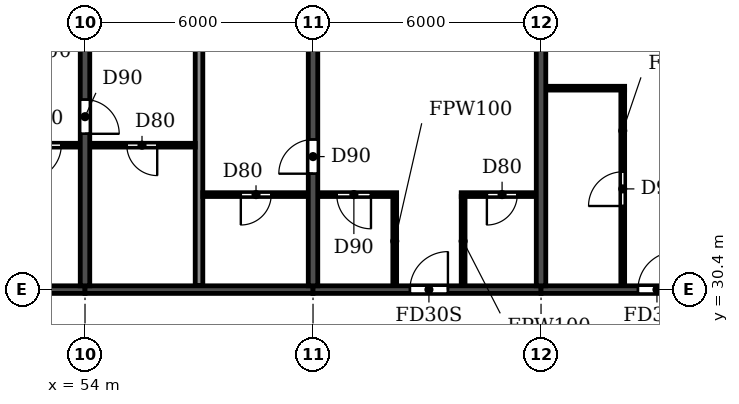
"""IFC4 building model, lengths in metres.
Left out: names, types, materials, properties, quantities, classifications, styles, units other than length and angle.
Written with IfcOpenShell. Run it as: python <this file> out.ifc"""

import sys

from ifc_helpers import new_model, si_unit, direction, frame, frame_2d, origin, place, context, subcontext, project, spatial, rectangle, extrude, element, fill, save


model = new_model("IFC4")
c1 = context("Model", 3, precision=1e-05, world=origin(), true_north=direction((0.0, 1.0)))
c2 = subcontext(c1, "Body", "Model", "MODEL_VIEW")
j1 = project(units=[si_unit("LENGTHUNIT", "METRE"), si_unit("PLANEANGLEUNIT", "RADIAN")], contexts=[c1])
p1 = place(None, origin())
s1 = spatial("IfcSite", under=j1, at=p1, CompositionType="ELEMENT")
p2 = place(p1, origin())
s2 = spatial("IfcBuilding", under=s1, at=p2, CompositionType="ELEMENT")
p3 = place(p2, frame((0.0, 0.0, 221.4)))
s3 = spatial("IfcBuildingStorey", under=s2, at=p3, CompositionType="ELEMENT", Elevation=221.4)
p4 = place(p3, frame((54.0, 30.5, 0.0), z_axis=(0.0, 0.0, 1.0), x_axis=(0.0, 1.0, 0.0)))
e1 = element("IfcWall", 1, at=p4, inside=s3, PredefinedType="SHEAR", context=c2, shape_type="SweptSolid", body=[
    extrude(rectangle(XDim=10.5, YDim=0.25, at=frame_2d((5.25, 0.0))), origin(), (0.0, 0.0, 1.0), 3.08),
])
p5 = place(p4, frame((4.0, 0.0, 0.0)))
e2 = element("IfcOpeningElement", 2, at=p5, cuts=e1, PredefinedType="OPENING", context=c2, shape_type="SweptSolid", body=[
    extrude(rectangle(XDim=0.9, YDim=2.1, at=frame_2d((0.45, 1.05))), frame((0.0, 0.135, 0.0), z_axis=(0.0, -1.0, 0.0), x_axis=(1.0, 0.0, 0.0)), (0.0, 0.0, 1.0), 0.27),
])
p6 = place(p3, frame((60.0, 30.5, 0.0), z_axis=(0.0, 0.0, 1.0), x_axis=(0.0, 1.0, 0.0)))
e3 = element("IfcWall", 3, at=p6, inside=s3, PredefinedType="SHEAR", context=c2, shape_type="SweptSolid", body=[
    extrude(rectangle(XDim=10.5, YDim=0.25, at=frame_2d((5.25, 0.0))), origin(), (0.0, 0.0, 1.0), 3.08),
])
p7 = place(p6, frame((2.95, 0.0, 0.0)))
e4 = element("IfcOpeningElement", 4, at=p7, cuts=e3, PredefinedType="OPENING", context=c2, shape_type="SweptSolid", body=[
    extrude(rectangle(XDim=0.9, YDim=2.1, at=frame_2d((0.45, 1.05))), frame((0.0, 0.135, 0.0), z_axis=(0.0, -1.0, 0.0), x_axis=(1.0, 0.0, 0.0)), (0.0, 0.0, 1.0), 0.27),
])
p8 = place(p3, frame((66.0, 30.5, 0.0), z_axis=(0.0, 0.0, 1.0), x_axis=(0.0, 1.0, 0.0)))
e5 = element("IfcWall", 5, at=p8, inside=s3, PredefinedType="SHEAR", context=c2, shape_type="SweptSolid", body=[
    extrude(rectangle(XDim=10.5, YDim=0.25, at=frame_2d((5.25, 0.0))), origin(), (0.0, 0.0, 1.0), 3.08),
])
p9 = place(p3, frame((48.0, 30.4, 0.0), z_axis=(0.0, 0.0, 1.0), x_axis=(1.0, 0.0, 0.0)))
e6 = element("IfcWall", 6, at=p9, inside=s3, PredefinedType="SHEAR", context=c2, shape_type="SweptSolid", body=[
    extrude(rectangle(XDim=6.0, YDim=0.2, at=frame_2d((3.0, 0.0))), origin(), (0.0, 0.0, 1.0), 2.48),
])
p10 = place(p9, frame((2.45, 0.0, 0.0)))
e7 = element("IfcOpeningElement", 7, at=p10, cuts=e6, PredefinedType="OPENING", context=c2, shape_type="SweptSolid", body=[
    extrude(rectangle(XDim=1.0, YDim=2.1, at=frame_2d((0.5, 1.05))), frame((0.0, 0.11, 0.0), z_axis=(0.0, -1.0, 0.0), x_axis=(1.0, 0.0, 0.0)), (0.0, 0.0, 1.0), 0.22),
])
p11 = place(p3, frame((54.0, 30.4, 0.0), z_axis=(0.0, 0.0, 1.0), x_axis=(1.0, 0.0, 0.0)))
e8 = element("IfcWall", 8, at=p11, inside=s3, PredefinedType="SHEAR", context=c2, shape_type="SweptSolid", body=[
    extrude(rectangle(XDim=6.0, YDim=0.2, at=frame_2d((3.0, 0.0))), origin(), (0.0, 0.0, 1.0), 2.48),
])
p12 = place(p3, frame((60.0, 30.4, 0.0), z_axis=(0.0, 0.0, 1.0), x_axis=(1.0, 0.0, 0.0)))
e9 = element("IfcWall", 9, at=p12, inside=s3, PredefinedType="SHEAR", context=c2, shape_type="SweptSolid", body=[
    extrude(rectangle(XDim=6.0, YDim=0.2, at=frame_2d((3.0, 0.0))), origin(), (0.0, 0.0, 1.0), 2.48),
])
p13 = place(p12, frame((2.55, 0.0, 0.0)))
e10 = element("IfcOpeningElement", 10, at=p13, cuts=e9, PredefinedType="OPENING", context=c2, shape_type="SweptSolid", body=[
    extrude(rectangle(XDim=1.0, YDim=2.1, at=frame_2d((0.5, 1.05))), frame((0.0, 0.11, 0.0), z_axis=(0.0, -1.0, 0.0), x_axis=(1.0, 0.0, 0.0)), (0.0, 0.0, 1.0), 0.22),
])
p14 = place(p3, frame((66.0, 30.4, 0.0), z_axis=(0.0, 0.0, 1.0), x_axis=(1.0, 0.0, 0.0)))
e11 = element("IfcWall", 11, at=p14, inside=s3, PredefinedType="SHEAR", context=c2, shape_type="SweptSolid", body=[
    extrude(rectangle(XDim=6.0, YDim=0.2, at=frame_2d((3.0, 0.0))), origin(), (0.0, 0.0, 1.0), 2.48),
])
p15 = place(p14, frame((2.55, 0.0, 0.0)))
e12 = element("IfcOpeningElement", 12, at=p15, cuts=e11, PredefinedType="OPENING", context=c2, shape_type="SweptSolid", body=[
    extrude(rectangle(XDim=1.0, YDim=2.1, at=frame_2d((0.5, 1.05))), frame((0.0, 0.11, 0.0), z_axis=(0.0, -1.0, 0.0), x_axis=(1.0, 0.0, 0.0)), (0.0, 0.0, 1.0), 0.22),
])
p16 = place(p3, frame((57.0, 30.51, 0.0), z_axis=(0.0, 0.0, 1.0), x_axis=(0.0, 1.0, 0.0)))
e13 = element("IfcWall", 13, at=p16, inside=s3, PredefinedType="PARTITIONING", context=c2, shape_type="SweptSolid", body=[
    extrude(rectangle(XDim=10.63, YDim=0.2, at=frame_2d((5.315, 0.0))), origin(), (0.0, 0.0, 1.0), 3.08),
])
p17 = place(p3, frame((57.1, 32.9, 0.0), z_axis=(0.0, 0.0, 1.0), x_axis=(1.0, 0.0, 0.0)))
e14 = element("IfcWall", 14, at=p17, inside=s3, PredefinedType="PARTITIONING", context=c2, shape_type="SweptSolid", body=[
    extrude(rectangle(XDim=2.765, YDim=0.1, at=frame_2d((1.382, 0.0))), origin(), (0.0, 0.0, 1.0), 3.08),
])
p18 = place(p17, frame((1.0, 0.0, 0.0)))
e15 = element("IfcOpeningElement", 15, at=p18, cuts=e14, PredefinedType="OPENING", context=c2, shape_type="SweptSolid", body=[
    extrude(rectangle(XDim=0.8, YDim=2.1, at=frame_2d((0.4, 1.05))), frame((0.0, 0.06, 0.0), z_axis=(0.0, -1.0, 0.0), x_axis=(1.0, 0.0, 0.0)), (0.0, 0.0, 1.0), 0.12),
])
p19 = place(p3, frame((60.135, 32.9, 0.0), z_axis=(0.0, 0.0, 1.0), x_axis=(1.0, 0.0, 0.0)))
e16 = element("IfcWall", 16, at=p19, inside=s3, PredefinedType="PARTITIONING", context=c2, shape_type="SweptSolid", body=[
    extrude(rectangle(XDim=2.065, YDim=0.1, at=frame_2d((1.032, 0.0))), origin(), (0.0, 0.0, 1.0), 3.08),
])
p20 = place(p19, frame((0.49, 0.0, 0.0)))
e17 = element("IfcOpeningElement", 17, at=p20, cuts=e16, PredefinedType="OPENING", context=c2, shape_type="SweptSolid", body=[
    extrude(rectangle(XDim=0.9, YDim=2.1, at=frame_2d((0.45, 1.05))), frame((0.0, 0.06, 0.0), z_axis=(0.0, -1.0, 0.0), x_axis=(1.0, 0.0, 0.0)), (0.0, 0.0, 1.0), 0.12),
])
p21 = place(p3, frame((63.9, 32.9, 0.0), z_axis=(0.0, 0.0, 1.0), x_axis=(1.0, 0.0, 0.0)))
e18 = element("IfcWall", 18, at=p21, inside=s3, PredefinedType="PARTITIONING", context=c2, shape_type="SweptSolid", body=[
    extrude(rectangle(XDim=1.965, YDim=0.1, at=frame_2d((0.982, 0.0))), origin(), (0.0, 0.0, 1.0), 3.08),
])
p22 = place(p21, frame((0.675, 0.0, 0.0)))
e19 = element("IfcOpeningElement", 19, at=p22, cuts=e18, PredefinedType="OPENING", context=c2, shape_type="SweptSolid", body=[
    extrude(rectangle(XDim=0.8, YDim=2.1, at=frame_2d((0.4, 1.05))), frame((0.0, 0.06, 0.0), z_axis=(0.0, -1.0, 0.0), x_axis=(1.0, 0.0, 0.0)), (0.0, 0.0, 1.0), 0.12),
])
p23 = place(p3, frame((51.8, 34.2, 0.0), z_axis=(0.0, 0.0, 1.0), x_axis=(1.0, 0.0, 0.0)))
e20 = element("IfcWall", 20, at=p23, inside=s3, PredefinedType="PARTITIONING", context=c2, shape_type="SweptSolid", body=[
    extrude(rectangle(XDim=2.065, YDim=0.1, at=frame_2d((1.032, 0.0))), origin(), (0.0, 0.0, 1.0), 3.08),
])
p24 = place(p23, frame((0.675, 0.0, 0.0)))
e21 = element("IfcOpeningElement", 21, at=p24, cuts=e20, PredefinedType="OPENING", context=c2, shape_type="SweptSolid", body=[
    extrude(rectangle(XDim=0.9, YDim=2.1, at=frame_2d((0.45, 1.05))), frame((0.0, 0.06, 0.0), z_axis=(0.0, -1.0, 0.0), x_axis=(1.0, 0.0, 0.0)), (0.0, 0.0, 1.0), 0.12),
])
p25 = place(p3, frame((54.135, 34.2, 0.0), z_axis=(0.0, 0.0, 1.0), x_axis=(1.0, 0.0, 0.0)))
e22 = element("IfcWall", 22, at=p25, inside=s3, PredefinedType="PARTITIONING", context=c2, shape_type="SweptSolid", body=[
    extrude(rectangle(XDim=2.765, YDim=0.1, at=frame_2d((1.382, 0.0))), origin(), (0.0, 0.0, 1.0), 3.08),
])
p26 = place(p25, frame((0.965, 0.0, 0.0)))
e23 = element("IfcOpeningElement", 23, at=p26, cuts=e22, PredefinedType="OPENING", context=c2, shape_type="SweptSolid", body=[
    extrude(rectangle(XDim=0.8, YDim=2.1, at=frame_2d((0.4, 1.05))), frame((0.0, 0.06, 0.0), z_axis=(0.0, -1.0, 0.0), x_axis=(1.0, 0.0, 0.0)), (0.0, 0.0, 1.0), 0.12),
])
p27 = place(p3, frame((66.135, 35.7, 0.0), z_axis=(0.0, 0.0, 1.0), x_axis=(1.0, 0.0, 0.0)))
e24 = element("IfcWall", 24, at=p27, inside=s3, PredefinedType="PARTITIONING", context=c2, shape_type="SweptSolid", body=[
    extrude(rectangle(XDim=2.065, YDim=0.1, at=frame_2d((1.032, 0.0))), origin(), (0.0, 0.0, 1.0), 3.08),
])
for number, where, z_axis, x_axis in (
    (25, (62.15, 30.51, 0.0), (0.0, 0.0, 1.0), (0.0, 1.0, 0.0)),
    (26, (63.95, 30.51, 0.0), (0.0, 0.0, 1.0), (0.0, 1.0, 0.0)),
):
    element("IfcWall", number, at=place(p3, frame(where, z_axis=z_axis, x_axis=x_axis)), inside=s3, PredefinedType="PARTITIONING", context=c2, shape_type="SweptSolid", body=[
        extrude(rectangle(XDim=2.34, YDim=0.1, at=frame_2d((1.17, 0.0))), origin(), (0.0, 0.0, 1.0), 3.08),
    ])
p28 = place(p3, frame((68.15, 30.51, 0.0), z_axis=(0.0, 0.0, 1.0), x_axis=(0.0, 1.0, 0.0)))
e27 = element("IfcWall", 27, at=p28, inside=s3, PredefinedType="PARTITIONING", context=c2, shape_type="SweptSolid", body=[
    extrude(rectangle(XDim=5.14, YDim=0.1, at=frame_2d((2.57, 0.0))), origin(), (0.0, 0.0, 1.0), 3.08),
])
p29 = place(p28, frame((2.09, 0.0, 0.0)))
e28 = element("IfcOpeningElement", 28, at=p29, cuts=e27, PredefinedType="OPENING", context=c2, shape_type="SweptSolid", body=[
    extrude(rectangle(XDim=0.9, YDim=2.1, at=frame_2d((0.45, 1.05))), frame((0.0, 0.06, 0.0), z_axis=(0.0, -1.0, 0.0), x_axis=(1.0, 0.0, 0.0)), (0.0, 0.0, 1.0), 0.12),
])
p30 = place(p26, frame((0.8, 0.0, 0.0), z_axis=(0.0, 0.0, 1.0), x_axis=(-1.0, 0.0, 0.0)))
e29 = element("IfcDoor", 29, at=p30, inside=s3, OperationType="SINGLE_SWING_LEFT", PredefinedType="DOOR", context=c2, shape_type="SweptSolid", body=[
    extrude(rectangle(XDim=0.8, YDim=2.1, at=frame_2d((0.4, 1.05))), frame((0.0, 0.025, 0.0), z_axis=(0.0, -1.0, 0.0), x_axis=(1.0, 0.0, 0.0)), (0.0, 0.0, 1.0), 0.05),
])
fill(e23, e29)
p31 = place(p24, frame((0.9, 0.0, 0.0), z_axis=(0.0, 0.0, 1.0), x_axis=(-1.0, 0.0, 0.0)))
e30 = element("IfcDoor", 30, at=p31, inside=s3, OperationType="SINGLE_SWING_RIGHT", PredefinedType="DOOR", context=c2, shape_type="SweptSolid", body=[
    extrude(rectangle(XDim=0.9, YDim=2.1, at=frame_2d((0.45, 1.05))), frame((0.0, 0.025, 0.0), z_axis=(0.0, -1.0, 0.0), x_axis=(1.0, 0.0, 0.0)), (0.0, 0.0, 1.0), 0.05),
])
fill(e21, e30)
p32 = place(p5, frame((0.9, 0.0, 0.0), z_axis=(0.0, 0.0, 1.0), x_axis=(-1.0, 0.0, 0.0)))
e31 = element("IfcDoor", 31, at=p32, inside=s3, OperationType="SINGLE_SWING_RIGHT", PredefinedType="DOOR", context=c2, shape_type="SweptSolid", body=[
    extrude(rectangle(XDim=0.9, YDim=2.1, at=frame_2d((0.45, 1.05))), frame((0.0, 0.025, 0.0), z_axis=(0.0, -1.0, 0.0), x_axis=(1.0, 0.0, 0.0)), (0.0, 0.0, 1.0), 0.05),
])
fill(e2, e31)
p33 = place(p18, frame((0.8, 0.0, 0.0), z_axis=(0.0, 0.0, 1.0), x_axis=(-1.0, 0.0, 0.0)))
e32 = element("IfcDoor", 32, at=p33, inside=s3, OperationType="SINGLE_SWING_RIGHT", PredefinedType="DOOR", context=c2, shape_type="SweptSolid", body=[
    extrude(rectangle(XDim=0.8, YDim=2.1, at=frame_2d((0.4, 1.05))), frame((0.0, 0.025, 0.0), z_axis=(0.0, -1.0, 0.0), x_axis=(1.0, 0.0, 0.0)), (0.0, 0.0, 1.0), 0.05),
])
fill(e15, e32)
p34 = place(p7, origin())
e33 = element("IfcDoor", 33, at=p34, inside=s3, OperationType="SINGLE_SWING_LEFT", PredefinedType="DOOR", context=c2, shape_type="SweptSolid", body=[
    extrude(rectangle(XDim=0.9, YDim=2.1, at=frame_2d((0.45, 1.05))), frame((0.0, 0.025, 0.0), z_axis=(0.0, -1.0, 0.0), x_axis=(1.0, 0.0, 0.0)), (0.0, 0.0, 1.0), 0.05),
])
fill(e4, e33)
p35 = place(p20, frame((0.9, 0.0, 0.0), z_axis=(0.0, 0.0, 1.0), x_axis=(-1.0, 0.0, 0.0)))
e34 = element("IfcDoor", 34, at=p35, inside=s3, OperationType="SINGLE_SWING_LEFT", PredefinedType="DOOR", context=c2, shape_type="SweptSolid", body=[
    extrude(rectangle(XDim=0.9, YDim=2.1, at=frame_2d((0.45, 1.05))), frame((0.0, 0.025, 0.0), z_axis=(0.0, -1.0, 0.0), x_axis=(1.0, 0.0, 0.0)), (0.0, 0.0, 1.0), 0.05),
])
fill(e17, e34)
p36 = place(p13, origin())
e35 = element("IfcDoor", 35, at=p36, inside=s3, OperationType="SINGLE_SWING_RIGHT", PredefinedType="DOOR", context=c2, shape_type="SweptSolid", body=[
    extrude(rectangle(XDim=1.0, YDim=2.1, at=frame_2d((0.5, 1.05))), frame((0.0, 0.025, 0.0), z_axis=(0.0, -1.0, 0.0), x_axis=(1.0, 0.0, 0.0)), (0.0, 0.0, 1.0), 0.05),
])
fill(e10, e35)
p37 = place(p22, frame((0.8, 0.0, 0.0), z_axis=(0.0, 0.0, 1.0), x_axis=(-1.0, 0.0, 0.0)))
e36 = element("IfcDoor", 36, at=p37, inside=s3, OperationType="SINGLE_SWING_RIGHT", PredefinedType="DOOR", context=c2, shape_type="SweptSolid", body=[
    extrude(rectangle(XDim=0.8, YDim=2.1, at=frame_2d((0.4, 1.05))), frame((0.0, 0.025, 0.0), z_axis=(0.0, -1.0, 0.0), x_axis=(1.0, 0.0, 0.0)), (0.0, 0.0, 1.0), 0.05),
])
fill(e19, e36)
p38 = place(p29, origin())
e37 = element("IfcDoor", 37, at=p38, inside=s3, OperationType="SINGLE_SWING_LEFT", PredefinedType="DOOR", context=c2, shape_type="SweptSolid", body=[
    extrude(rectangle(XDim=0.9, YDim=2.1, at=frame_2d((0.45, 1.05))), frame((0.0, 0.025, 0.0), z_axis=(0.0, -1.0, 0.0), x_axis=(1.0, 0.0, 0.0)), (0.0, 0.0, 1.0), 0.05),
])
fill(e28, e37)
p39 = place(p15, origin())
e38 = element("IfcDoor", 38, at=p39, inside=s3, OperationType="SINGLE_SWING_RIGHT", PredefinedType="DOOR", context=c2, shape_type="SweptSolid", body=[
    extrude(rectangle(XDim=1.0, YDim=2.1, at=frame_2d((0.5, 1.05))), frame((0.0, 0.025, 0.0), z_axis=(0.0, -1.0, 0.0), x_axis=(1.0, 0.0, 0.0)), (0.0, 0.0, 1.0), 0.05),
])
fill(e12, e38)
save(model, sys.argv[1])
